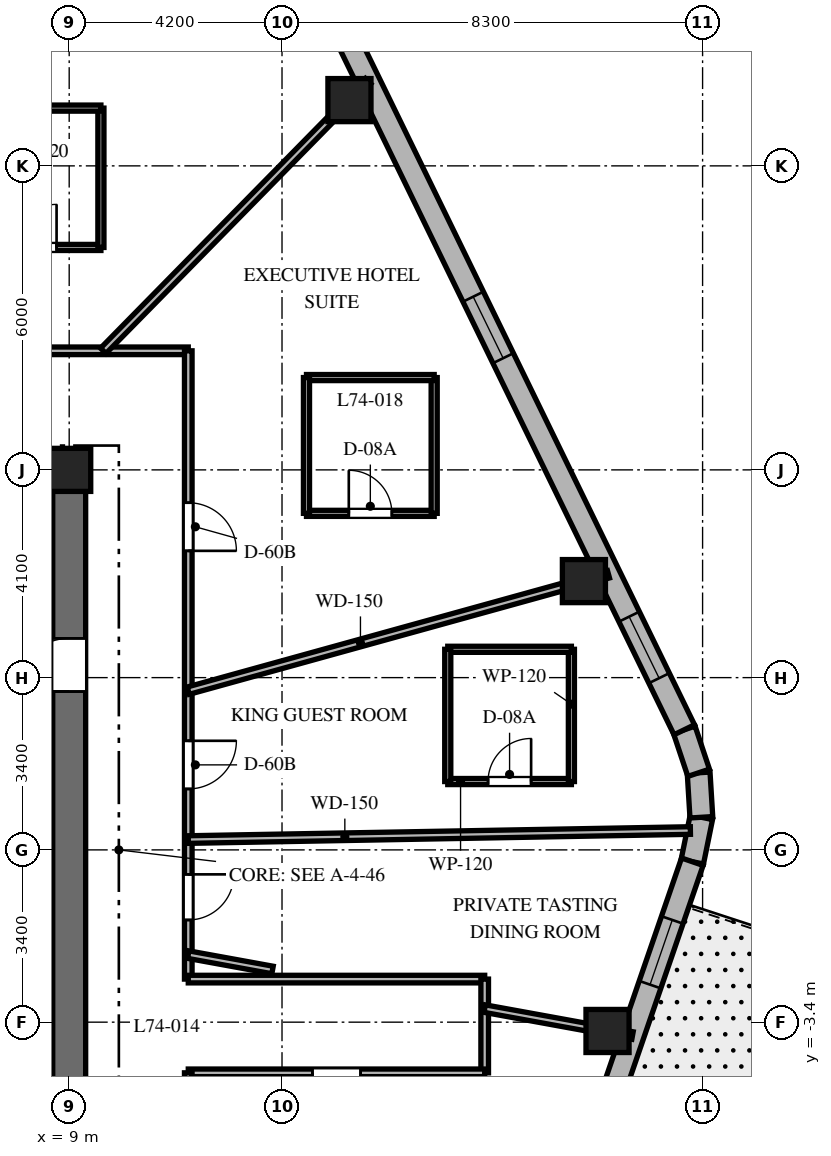
"""IFC4 building model, lengths in metres.
Left out: names, types, materials, properties, quantities, classifications, styles, units other than length and angle.
Written with IfcOpenShell. Run it as: python <this file> out.ifc"""

import sys

from ifc_helpers import new_model, si_unit, direction, frame, frame_2d, origin, origin_2d, place, context, subcontext, project, spatial, rectangle, extrude, element, fill, save


model = new_model("IFC4")
c1 = context("Model", 3, precision=1e-05, world=origin(), true_north=direction((0.0, 1.0)))
c2 = subcontext(c1, "Body", "Model", "MODEL_VIEW")
j1 = project(units=[si_unit("LENGTHUNIT", "METRE"), si_unit("PLANEANGLEUNIT", "RADIAN")], contexts=[c1])
p1 = place(None, origin())
s1 = spatial("IfcSite", under=j1, at=p1, CompositionType="ELEMENT")
p2 = place(p1, origin())
s2 = spatial("IfcBuilding", under=s1, at=p2, CompositionType="ELEMENT")
p3 = place(p2, frame((0.0, 0.0, 297.6)))
s3 = spatial("IfcBuildingStorey", under=s2, at=p3, CompositionType="ELEMENT", Elevation=297.6)
p4 = place(p3, frame((1.85, 7.5, 0.0), z_axis=(0.0, 0.0, 1.0), x_axis=(1.0, 0.0, 0.0)))
e1 = element("IfcWall", 1, at=p4, inside=s3, PredefinedType="SHEAR", context=c2, shape_type="SweptSolid", body=[
    extrude(rectangle(XDim=7.475, YDim=0.65, at=frame_2d((3.737, 0.0))), origin(), (0.0, 0.0, 1.0), 3.9),
])
p5 = place(p3, frame((9.0, -7.175, 0.0), z_axis=(0.0, 0.0, 1.0), x_axis=(0.0, 1.0, 0.0)))
e2 = element("IfcWall", 2, at=p5, inside=s3, PredefinedType="SHEAR", context=c2, shape_type="SweptSolid", body=[
    extrude(rectangle(XDim=14.35, YDim=0.65, at=frame_2d((7.175, 0.0))), origin(), (0.0, 0.0, 1.0), 3.9),
])
p6 = place(p5, frame((10.3, 0.0, 0.0)))
e3 = element("IfcOpeningElement", 3, at=p6, cuts=e2, PredefinedType="OPENING", context=c2, shape_type="SweptSolid", body=[
    extrude(rectangle(XDim=1.05, YDim=2.15, at=frame_2d((0.525, 1.075))), frame((0.0, 0.335, 0.0), z_axis=(0.0, -1.0, 0.0), x_axis=(1.0, 0.0, 0.0)), (0.0, 0.0, 1.0), 0.67),
])
for number, where, z_axis, x_axis in (
    (4, (9.0, 7.5, 0.0), (0.0, 0.0, 1.0), (1.0, 0.0, 0.0)),
    (5, (19.624, -3.574, 0.0), (0.0, 0.0, 1.0), (1.0, 0.0, 0.0)),
    (6, (19.158, 5.305, 0.0), (0.0, 0.0, 1.0), (1.0, 0.0, 0.0)),
    (7, (14.531, 14.798, 0.0), (0.0, 0.0, 1.0), (1.0, 0.0, 0.0)),
):
    element("IfcColumn", number, at=place(p3, frame(where, z_axis=z_axis, x_axis=x_axis)), inside=s3, PredefinedType="COLUMN", context=c2, shape_type="SweptSolid", body=[
        extrude(rectangle(XDim=0.85, YDim=0.85, at=origin_2d()), origin(), (0.0, 0.0, 1.0), 3.9),
    ])
p7 = place(p3, frame((21.298, -0.233, 0.0), z_axis=(0.0, 0.0, 1.0), x_axis=(0.199158176661, 0.979967356941, 0.0)))
e8 = element("IfcWall", 8, at=p7, inside=s3, PredefinedType="SOLIDWALL", context=c2, shape_type="SweptSolid", body=[
    extrude(rectangle(XDim=0.895, YDim=0.45, at=frame_2d((0.447, 0.0))), origin(), (0.0, 0.0, 1.0), 3.6),
])
p8 = place(p3, frame((21.476, 0.644, 0.0), z_axis=(0.0, 0.0, 1.0), x_axis=(-0.061031097918, 0.998135865044, 0.0)))
e9 = element("IfcWall", 9, at=p8, inside=s3, PredefinedType="SOLIDWALL", context=c2, shape_type="SweptSolid", body=[
    extrude(rectangle(XDim=0.88, YDim=0.45, at=frame_2d((0.44, 0.0))), origin(), (0.0, 0.0, 1.0), 3.6),
])
p9 = place(p3, frame((21.422, 1.522, 0.0), z_axis=(0.0, 0.0, 1.0), x_axis=(-0.316964162323, 0.94843751497, 0.0)))
e10 = element("IfcWall", 10, at=p9, inside=s3, PredefinedType="SOLIDWALL", context=c2, shape_type="SweptSolid", body=[
    extrude(rectangle(XDim=0.895, YDim=0.45, at=frame_2d((0.448, 0.0))), origin(), (0.0, 0.0, 1.0), 3.6),
])
p10 = place(p3, frame((15.26, -17.776, 0.0), z_axis=(0.0, 0.0, 1.0), x_axis=(0.325407437101, 0.945573899745, 0.0)))
e11 = element("IfcWall", 11, at=p10, inside=s3, PredefinedType="SOLIDWALL", context=c2, shape_type="SweptSolid", body=[
    extrude(rectangle(XDim=18.552, YDim=0.45, at=frame_2d((9.276, 0.0))), origin(), (0.0, 0.0, 1.0), 3.6),
])
p11 = place(p10, frame((4.602, 0.0, 0.0)))
e12 = element("IfcOpeningElement", 12, at=p11, cuts=e11, PredefinedType="OPENING", context=c2, shape_type="SweptSolid", body=[
    extrude(rectangle(XDim=0.95, YDim=2.15, at=frame_2d((0.475, 1.075))), frame((0.0, 0.235, 0.0), z_axis=(0.0, -1.0, 0.0), x_axis=(1.0, 0.0, 0.0)), (0.0, 0.0, 1.0), 0.47),
])
p12 = place(p10, frame((1.161, 0.0, 0.8)))
e13 = element("IfcOpeningElement", 13, at=p12, cuts=e11, PredefinedType="OPENING", context=c2, shape_type="SweptSolid", body=[
    extrude(rectangle(XDim=1.35, YDim=1.75, at=frame_2d((0.675, 0.875))), frame((0.0, 0.235, 0.0), z_axis=(0.0, -1.0, 0.0), x_axis=(1.0, 0.0, 0.0)), (0.0, 0.0, 1.0), 0.47),
])
p13 = place(p10, frame((8.548, 0.0, 0.8)))
e14 = element("IfcOpeningElement", 14, at=p13, cuts=e11, PredefinedType="OPENING", context=c2, shape_type="SweptSolid", body=[
    extrude(rectangle(XDim=1.35, YDim=1.75, at=frame_2d((0.675, 0.875))), frame((0.0, 0.235, 0.0), z_axis=(0.0, -1.0, 0.0), x_axis=(1.0, 0.0, 0.0)), (0.0, 0.0, 1.0), 0.47),
])
p14 = place(p10, frame((15.987, 0.0, 0.8)))
e15 = element("IfcOpeningElement", 15, at=p14, cuts=e11, PredefinedType="OPENING", context=c2, shape_type="SweptSolid", body=[
    extrude(rectangle(XDim=1.35, YDim=1.75, at=frame_2d((0.675, 0.875))), frame((0.0, 0.235, 0.0), z_axis=(0.0, -1.0, 0.0), x_axis=(1.0, 0.0, 0.0)), (0.0, 0.0, 1.0), 0.47),
])
p15 = place(p3, frame((21.138, 2.371, 0.0), z_axis=(0.0, 0.0, 1.0), x_axis=(-0.438128124058, 0.89891253574, 0.0)))
e16 = element("IfcWall", 16, at=p15, inside=s3, PredefinedType="SOLIDWALL", context=c2, shape_type="SweptSolid", body=[
    extrude(rectangle(XDim=17.565, YDim=0.45, at=frame_2d((8.782, 0.0))), origin(), (0.0, 0.0, 1.0), 3.6),
])
p16 = place(p15, frame((1.133, 0.0, 0.8)))
e17 = element("IfcOpeningElement", 17, at=p16, cuts=e16, PredefinedType="OPENING", context=c2, shape_type="SweptSolid", body=[
    extrude(rectangle(XDim=1.35, YDim=1.75, at=frame_2d((0.675, 0.875))), frame((0.0, 0.235, 0.0), z_axis=(0.0, -1.0, 0.0), x_axis=(1.0, 0.0, 0.0)), (0.0, 0.0, 1.0), 0.47),
])
p17 = place(p15, frame((8.158, 0.0, 0.8)))
e18 = element("IfcOpeningElement", 18, at=p17, cuts=e16, PredefinedType="OPENING", context=c2, shape_type="SweptSolid", body=[
    extrude(rectangle(XDim=1.35, YDim=1.75, at=frame_2d((0.675, 0.875))), frame((0.0, 0.235, 0.0), z_axis=(0.0, -1.0, 0.0), x_axis=(1.0, 0.0, 0.0)), (0.0, 0.0, 1.0), 0.47),
])
p18 = place(p15, frame((15.132, 0.0, 0.8)))
e19 = element("IfcOpeningElement", 19, at=p18, cuts=e16, PredefinedType="OPENING", context=c2, shape_type="SweptSolid", body=[
    extrude(rectangle(XDim=1.35, YDim=1.75, at=frame_2d((0.675, 0.875))), frame((0.0, 0.235, 0.0), z_axis=(0.0, -1.0, 0.0), x_axis=(1.0, 0.0, 0.0)), (0.0, 0.0, 1.0), 0.47),
])
p19 = place(p3, frame((0.92, 9.85, 0.0), z_axis=(0.0, 0.0, 1.0), x_axis=(1.0, 0.0, 0.0)))
e20 = element("IfcWall", 20, at=p19, inside=s3, PredefinedType="PARTITIONING", context=c2, shape_type="SweptSolid", body=[
    extrude(rectangle(XDim=10.43, YDim=0.15, at=frame_2d((5.215, 0.0))), origin(), (0.0, 0.0, 1.0), 2.816),
])
p20 = place(p19, frame((4.975, 0.0, 0.0)))
e21 = element("IfcOpeningElement", 21, at=p20, cuts=e20, PredefinedType="OPENING", context=c2, shape_type="SweptSolid", body=[
    extrude(rectangle(XDim=0.95, YDim=2.03, at=frame_2d((0.475, 1.015))), frame((0.0, 0.085, 0.0), z_axis=(0.0, -1.0, 0.0), x_axis=(1.0, 0.0, 0.0)), (0.0, 0.0, 1.0), 0.17),
])
p21 = place(p3, frame((11.35, 9.85, 0.0), z_axis=(0.0, 0.0, 1.0), x_axis=(0.0, -1.0, 0.0)))
e22 = element("IfcWall", 22, at=p21, inside=s3, PredefinedType="PARTITIONING", context=c2, shape_type="SweptSolid", body=[
    extrude(rectangle(XDim=12.4, YDim=0.15, at=frame_2d((6.2, 0.0))), origin(), (0.0, 0.0, 1.0), 2.894),
])
p22 = place(p21, frame((7.697, 0.0, 0.0)))
e23 = element("IfcOpeningElement", 23, at=p22, cuts=e22, PredefinedType="OPENING", context=c2, shape_type="SweptSolid", body=[
    extrude(rectangle(XDim=0.95, YDim=2.03, at=frame_2d((0.475, 1.015))), frame((0.0, 0.085, 0.0), z_axis=(0.0, -1.0, 0.0), x_axis=(1.0, 0.0, 0.0)), (0.0, 0.0, 1.0), 0.17),
])
p23 = place(p21, frame((2.998, 0.0, 0.0)))
e24 = element("IfcOpeningElement", 24, at=p23, cuts=e22, PredefinedType="OPENING", context=c2, shape_type="SweptSolid", body=[
    extrude(rectangle(XDim=0.95, YDim=2.03, at=frame_2d((0.475, 1.015))), frame((0.0, 0.085, 0.0), z_axis=(0.0, -1.0, 0.0), x_axis=(1.0, 0.0, 0.0)), (0.0, 0.0, 1.0), 0.17),
])
p24 = place(p21, frame((10.333, 0.0, 0.0)))
e25 = element("IfcOpeningElement", 25, at=p24, cuts=e22, PredefinedType="OPENING", context=c2, shape_type="SweptSolid", body=[
    extrude(rectangle(XDim=0.9, YDim=2.03, at=frame_2d((0.45, 1.015))), frame((0.0, 0.085, 0.0), z_axis=(0.0, -1.0, 0.0), x_axis=(1.0, 0.0, 0.0)), (0.0, 0.0, 1.0), 0.17),
])
p25 = place(p3, frame((11.35, -2.55, 0.0), z_axis=(0.0, 0.0, 1.0), x_axis=(1.0, 0.0, 0.0)))
e26 = element("IfcWall", 26, at=p25, inside=s3, PredefinedType="PARTITIONING", context=c2, shape_type="SweptSolid", body=[
    extrude(rectangle(XDim=5.85, YDim=0.15, at=frame_2d((2.925, 0.0))), origin(), (0.0, 0.0, 1.0), 3.04),
])
p26 = place(p3, frame((17.2, -2.55, 0.0), z_axis=(0.0, 0.0, 1.0), x_axis=(0.0, -1.0, 0.0)))
e27 = element("IfcWall", 27, at=p26, inside=s3, PredefinedType="PARTITIONING", context=c2, shape_type="SweptSolid", body=[
    extrude(rectangle(XDim=1.85, YDim=0.15, at=frame_2d((0.925, 0.0))), origin(), (0.0, 0.0, 1.0), 2.816),
])
p27 = place(p3, frame((17.2, -4.4, 0.0), z_axis=(0.0, 0.0, 1.0), x_axis=(-1.0, 0.0, 0.0)))
e28 = element("IfcWall", 28, at=p27, inside=s3, PredefinedType="PARTITIONING", context=c2, shape_type="SweptSolid", body=[
    extrude(rectangle(XDim=5.85, YDim=0.15, at=frame_2d((2.925, 0.0))), origin(), (0.0, 0.0, 1.0), 2.816),
])
p28 = place(p27, frame((2.45, 0.0, 0.0)))
e29 = element("IfcOpeningElement", 29, at=p28, cuts=e28, PredefinedType="OPENING", context=c2, shape_type="SweptSolid", body=[
    extrude(rectangle(XDim=0.95, YDim=2.03, at=frame_2d((0.475, 1.015))), frame((0.0, 0.085, 0.0), z_axis=(0.0, -1.0, 0.0), x_axis=(1.0, 0.0, 0.0)), (0.0, 0.0, 1.0), 0.17),
])
p29 = place(p3, frame((11.35, -4.4, 0.0), z_axis=(0.0, 0.0, 1.0), x_axis=(0.0, -1.0, 0.0)))
e30 = element("IfcWall", 30, at=p29, inside=s3, PredefinedType="PARTITIONING", context=c2, shape_type="SweptSolid", body=[
    extrude(rectangle(XDim=5.45, YDim=0.15, at=frame_2d((2.725, 0.0))), origin(), (0.0, 0.0, 1.0), 2.816),
])
p30 = place(p3, frame((11.35, 0.204, 0.0), z_axis=(0.0, 0.0, 1.0), x_axis=(0.999838748671, 0.017957635019, 0.0)))
e31 = element("IfcWall", 31, at=p30, inside=s3, PredefinedType="PARTITIONING", context=c2, shape_type="SweptSolid", body=[
    extrude(rectangle(XDim=9.911, YDim=0.15, at=frame_2d((4.956, 0.0))), origin(), (0.0, 0.0, 1.0), 2.94),
])
p31 = place(p3, frame((11.35, 3.143, 0.0), z_axis=(0.0, 0.0, 1.0), x_axis=(0.963731818141, 0.266872596386, 0.0)))
e32 = element("IfcWall", 32, at=p31, inside=s3, PredefinedType="PARTITIONING", context=c2, shape_type="SweptSolid", body=[
    extrude(rectangle(XDim=8.605, YDim=0.15, at=frame_2d((4.302, 0.0))), origin(), (0.0, 0.0, 1.0), 2.894),
])
p32 = place(p3, frame((9.672, 9.85, 0.0), z_axis=(0.0, 0.0, 1.0), x_axis=(0.700629771301, 0.713524998558, 0.0)))
e33 = element("IfcWall", 33, at=p32, inside=s3, PredefinedType="PARTITIONING", context=c2, shape_type="SweptSolid", body=[
    extrude(rectangle(XDim=7.459, YDim=0.15, at=frame_2d((3.73, 0.0))), origin(), (0.0, 0.0, 1.0), 2.94),
])
p33 = place(p3, frame((11.35, -2.067, 0.0), z_axis=(0.0, 0.0, 1.0), x_axis=(0.983807459651, -0.179228575665, 0.0)))
e34 = element("IfcWall", 34, at=p33, inside=s3, PredefinedType="PARTITIONING", context=c2, shape_type="SweptSolid", body=[
    extrude(rectangle(XDim=1.69, YDim=0.15, at=frame_2d((0.845, 0.0))), origin(), (0.0, 0.0, 1.0), 3.6),
])
p34 = place(p3, frame((17.2, -3.133, 0.0), z_axis=(0.0, 0.0, 1.0), x_axis=(0.983817168797, -0.179175272791, 0.0)))
e35 = element("IfcWall", 35, at=p34, inside=s3, PredefinedType="PARTITIONING", context=c2, shape_type="SweptSolid", body=[
    extrude(rectangle(XDim=2.965, YDim=0.15, at=frame_2d((1.482, 0.0))), origin(), (0.0, 0.0, 1.0), 2.816),
])
p35 = place(p3, frame((16.471, 1.349, 0.0), z_axis=(0.0, 0.0, 1.0), x_axis=(1.0, 0.0, 0.0)))
e36 = element("IfcWall", 36, at=p35, inside=s3, PredefinedType="PARTITIONING", context=c2, shape_type="SweptSolid", body=[
    extrude(rectangle(XDim=2.44, YDim=0.12, at=frame_2d((1.22, 0.0))), origin(), (0.0, 0.0, 1.0), 3.6),
])
p36 = place(p35, frame((0.795, 0.0, 0.0)))
e37 = element("IfcOpeningElement", 37, at=p36, cuts=e36, PredefinedType="OPENING", context=c2, shape_type="SweptSolid", body=[
    extrude(rectangle(XDim=0.85, YDim=2.03, at=frame_2d((0.425, 1.015))), frame((0.0, 0.07, 0.0), z_axis=(0.0, -1.0, 0.0), x_axis=(1.0, 0.0, 0.0)), (0.0, 0.0, 1.0), 0.14),
])
p37 = place(p3, frame((18.911, 1.349, 0.0), z_axis=(0.0, 0.0, 1.0), x_axis=(0.0, 1.0, 0.0)))
e38 = element("IfcWall", 38, at=p37, inside=s3, PredefinedType="PARTITIONING", context=c2, shape_type="SweptSolid", body=[
    extrude(rectangle(XDim=2.61, YDim=0.12, at=frame_2d((1.305, 0.0))), origin(), (0.0, 0.0, 1.0), 3.6),
])
p38 = place(p3, frame((18.911, 3.959, 0.0), z_axis=(0.0, 0.0, 1.0), x_axis=(-1.0, 0.0, 0.0)))
e39 = element("IfcWall", 39, at=p38, inside=s3, PredefinedType="PARTITIONING", context=c2, shape_type="SweptSolid", body=[
    extrude(rectangle(XDim=2.44, YDim=0.12, at=frame_2d((1.22, 0.0))), origin(), (0.0, 0.0, 1.0), 3.6),
])
p39 = place(p3, frame((16.471, 3.959, 0.0), z_axis=(0.0, 0.0, 1.0), x_axis=(0.0, -1.0, 0.0)))
e40 = element("IfcWall", 40, at=p39, inside=s3, PredefinedType="PARTITIONING", context=c2, shape_type="SweptSolid", body=[
    extrude(rectangle(XDim=2.61, YDim=0.12, at=frame_2d((1.305, 0.0))), origin(), (0.0, 0.0, 1.0), 3.6),
])
p40 = place(p3, frame((13.683, 6.642, 0.0), z_axis=(0.0, 0.0, 1.0), x_axis=(1.0, 0.0, 0.0)))
e41 = element("IfcWall", 41, at=p40, inside=s3, PredefinedType="PARTITIONING", context=c2, shape_type="SweptSolid", body=[
    extrude(rectangle(XDim=2.52, YDim=0.12, at=frame_2d((1.26, 0.0))), origin(), (0.0, 0.0, 1.0), 2.894),
])
p41 = place(p40, frame((0.835, 0.0, 0.0)))
e42 = element("IfcOpeningElement", 42, at=p41, cuts=e41, PredefinedType="OPENING", context=c2, shape_type="SweptSolid", body=[
    extrude(rectangle(XDim=0.85, YDim=2.03, at=frame_2d((0.425, 1.015))), frame((0.0, 0.07, 0.0), z_axis=(0.0, -1.0, 0.0), x_axis=(1.0, 0.0, 0.0)), (0.0, 0.0, 1.0), 0.14),
])
p42 = place(p3, frame((16.203, 6.642, 0.0), z_axis=(0.0, 0.0, 1.0), x_axis=(0.0, 1.0, 0.0)))
e43 = element("IfcWall", 43, at=p42, inside=s3, PredefinedType="PARTITIONING", context=c2, shape_type="SweptSolid", body=[
    extrude(rectangle(XDim=2.68, YDim=0.12, at=frame_2d((1.34, 0.0))), origin(), (0.0, 0.0, 1.0), 3.6),
])
p43 = place(p3, frame((16.203, 9.322, 0.0), z_axis=(0.0, 0.0, 1.0), x_axis=(-1.0, 0.0, 0.0)))
e44 = element("IfcWall", 44, at=p43, inside=s3, PredefinedType="PARTITIONING", context=c2, shape_type="SweptSolid", body=[
    extrude(rectangle(XDim=2.52, YDim=0.12, at=frame_2d((1.26, 0.0))), origin(), (0.0, 0.0, 1.0), 3.126),
])
p44 = place(p3, frame((13.683, 9.322, 0.0), z_axis=(0.0, 0.0, 1.0), x_axis=(0.0, -1.0, 0.0)))
e45 = element("IfcWall", 45, at=p44, inside=s3, PredefinedType="PARTITIONING", context=c2, shape_type="SweptSolid", body=[
    extrude(rectangle(XDim=2.68, YDim=0.12, at=frame_2d((1.34, 0.0))), origin(), (0.0, 0.0, 1.0), 3.172),
])
p45 = place(p3, frame((7.026, 11.89, 0.0), z_axis=(0.0, 0.0, 1.0), x_axis=(1.0, 0.0, 0.0)))
e46 = element("IfcWall", 46, at=p45, inside=s3, PredefinedType="PARTITIONING", context=c2, shape_type="SweptSolid", body=[
    extrude(rectangle(XDim=2.6, YDim=0.12, at=frame_2d((1.3, 0.0))), origin(), (0.0, 0.0, 1.0), 3.04),
])
p46 = place(p45, frame((0.875, 0.0, 0.0)))
e47 = element("IfcOpeningElement", 47, at=p46, cuts=e46, PredefinedType="OPENING", context=c2, shape_type="SweptSolid", body=[
    extrude(rectangle(XDim=0.85, YDim=2.03, at=frame_2d((0.425, 1.015))), frame((0.0, 0.07, 0.0), z_axis=(0.0, -1.0, 0.0), x_axis=(1.0, 0.0, 0.0)), (0.0, 0.0, 1.0), 0.14),
])
p47 = place(p3, frame((9.626, 11.89, 0.0), z_axis=(0.0, 0.0, 1.0), x_axis=(0.0, 1.0, 0.0)))
e48 = element("IfcWall", 48, at=p47, inside=s3, PredefinedType="PARTITIONING", context=c2, shape_type="SweptSolid", body=[
    extrude(rectangle(XDim=2.75, YDim=0.12, at=frame_2d((1.375, 0.0))), origin(), (0.0, 0.0, 1.0), 3.04),
])
p48 = place(p3, frame((9.626, 14.64, 0.0), z_axis=(0.0, 0.0, 1.0), x_axis=(-1.0, 0.0, 0.0)))
e49 = element("IfcWall", 49, at=p48, inside=s3, PredefinedType="PARTITIONING", context=c2, shape_type="SweptSolid", body=[
    extrude(rectangle(XDim=2.6, YDim=0.12, at=frame_2d((1.3, 0.0))), origin(), (0.0, 0.0, 1.0), 3.172),
])
p49 = place(p14, origin())
e50 = element("IfcWindow", 50, at=p49, inside=s3, PartitioningType="SINGLE_PANEL", PredefinedType="WINDOW", context=c2, shape_type="SweptSolid", body=[
    extrude(rectangle(XDim=1.35, YDim=1.75, at=frame_2d((0.675, 0.875))), frame((0.0, 0.03, 0.0), z_axis=(0.0, -1.0, 0.0), x_axis=(1.0, 0.0, 0.0)), (0.0, 0.0, 1.0), 0.06),
])
fill(e15, e50)
p50 = place(p16, origin())
e51 = element("IfcWindow", 51, at=p50, inside=s3, PartitioningType="SINGLE_PANEL", PredefinedType="WINDOW", context=c2, shape_type="SweptSolid", body=[
    extrude(rectangle(XDim=1.35, YDim=1.75, at=frame_2d((0.675, 0.875))), frame((0.0, 0.03, 0.0), z_axis=(0.0, -1.0, 0.0), x_axis=(1.0, 0.0, 0.0)), (0.0, 0.0, 1.0), 0.06),
])
fill(e17, e51)
p51 = place(p17, origin())
e52 = element("IfcWindow", 52, at=p51, inside=s3, PartitioningType="SINGLE_PANEL", PredefinedType="WINDOW", context=c2, shape_type="SweptSolid", body=[
    extrude(rectangle(XDim=1.35, YDim=1.75, at=frame_2d((0.675, 0.875))), frame((0.0, 0.03, 0.0), z_axis=(0.0, -1.0, 0.0), x_axis=(1.0, 0.0, 0.0)), (0.0, 0.0, 1.0), 0.06),
])
fill(e18, e52)
p52 = place(p6, origin())
e53 = element("IfcDoor", 53, at=p52, inside=s3, OperationType="SINGLE_SWING_LEFT", PredefinedType="DOOR", context=c2, shape_type="SweptSolid", body=[
    extrude(rectangle(XDim=1.05, YDim=2.15, at=frame_2d((0.525, 1.075))), frame((0.0, 0.025, 0.0), z_axis=(0.0, -1.0, 0.0), x_axis=(1.0, 0.0, 0.0)), (0.0, 0.0, 1.0), 0.05),
])
fill(e3, e53)
p53 = place(p22, origin())
e54 = element("IfcDoor", 54, at=p53, inside=s3, OperationType="SINGLE_SWING_LEFT", PredefinedType="DOOR", context=c2, shape_type="SweptSolid", body=[
    extrude(rectangle(XDim=0.95, YDim=2.03, at=frame_2d((0.475, 1.015))), frame((0.0, 0.025, 0.0), z_axis=(0.0, -1.0, 0.0), x_axis=(1.0, 0.0, 0.0)), (0.0, 0.0, 1.0), 0.05),
])
fill(e23, e54)
p54 = place(p36, origin())
e55 = element("IfcDoor", 55, at=p54, inside=s3, OperationType="SINGLE_SWING_RIGHT", PredefinedType="DOOR", context=c2, shape_type="SweptSolid", body=[
    extrude(rectangle(XDim=0.85, YDim=2.03, at=frame_2d((0.425, 1.015))), frame((0.0, 0.025, 0.0), z_axis=(0.0, -1.0, 0.0), x_axis=(1.0, 0.0, 0.0)), (0.0, 0.0, 1.0), 0.05),
])
fill(e37, e55)
p55 = place(p23, origin())
e56 = element("IfcDoor", 56, at=p55, inside=s3, OperationType="SINGLE_SWING_RIGHT", PredefinedType="DOOR", context=c2, shape_type="SweptSolid", body=[
    extrude(rectangle(XDim=0.95, YDim=2.03, at=frame_2d((0.475, 1.015))), frame((0.0, 0.025, 0.0), z_axis=(0.0, -1.0, 0.0), x_axis=(1.0, 0.0, 0.0)), (0.0, 0.0, 1.0), 0.05),
])
fill(e24, e56)
p56 = place(p41, origin())
e57 = element("IfcDoor", 57, at=p56, inside=s3, OperationType="SINGLE_SWING_LEFT", PredefinedType="DOOR", context=c2, shape_type="SweptSolid", body=[
    extrude(rectangle(XDim=0.85, YDim=2.03, at=frame_2d((0.425, 1.015))), frame((0.0, 0.025, 0.0), z_axis=(0.0, -1.0, 0.0), x_axis=(1.0, 0.0, 0.0)), (0.0, 0.0, 1.0), 0.05),
])
fill(e42, e57)
p57 = place(p46, origin())
e58 = element("IfcDoor", 58, at=p57, inside=s3, OperationType="SINGLE_SWING_RIGHT", PredefinedType="DOOR", context=c2, shape_type="SweptSolid", body=[
    extrude(rectangle(XDim=0.85, YDim=2.03, at=frame_2d((0.425, 1.015))), frame((0.0, 0.025, 0.0), z_axis=(0.0, -1.0, 0.0), x_axis=(1.0, 0.0, 0.0)), (0.0, 0.0, 1.0), 0.05),
])
fill(e47, e58)
p58 = place(p28, origin())
e59 = element("IfcDoor", 59, at=p58, inside=s3, OperationType="SINGLE_SWING_RIGHT", PredefinedType="DOOR", context=c2, shape_type="SweptSolid", body=[
    extrude(rectangle(XDim=0.95, YDim=2.03, at=frame_2d((0.475, 1.015))), frame((0.0, 0.025, 0.0), z_axis=(0.0, -1.0, 0.0), x_axis=(1.0, 0.0, 0.0)), (0.0, 0.0, 1.0), 0.05),
])
fill(e29, e59)
p59 = place(p24, origin())
e60 = element("IfcDoor", 60, at=p59, inside=s3, OperationType="SINGLE_SWING_LEFT", PredefinedType="DOOR", context=c2, shape_type="SweptSolid", body=[
    extrude(rectangle(XDim=0.9, YDim=2.03, at=frame_2d((0.45, 1.015))), frame((0.0, 0.025, 0.0), z_axis=(0.0, -1.0, 0.0), x_axis=(1.0, 0.0, 0.0)), (0.0, 0.0, 1.0), 0.05),
])
fill(e25, e60)
save(model, sys.argv[1])
